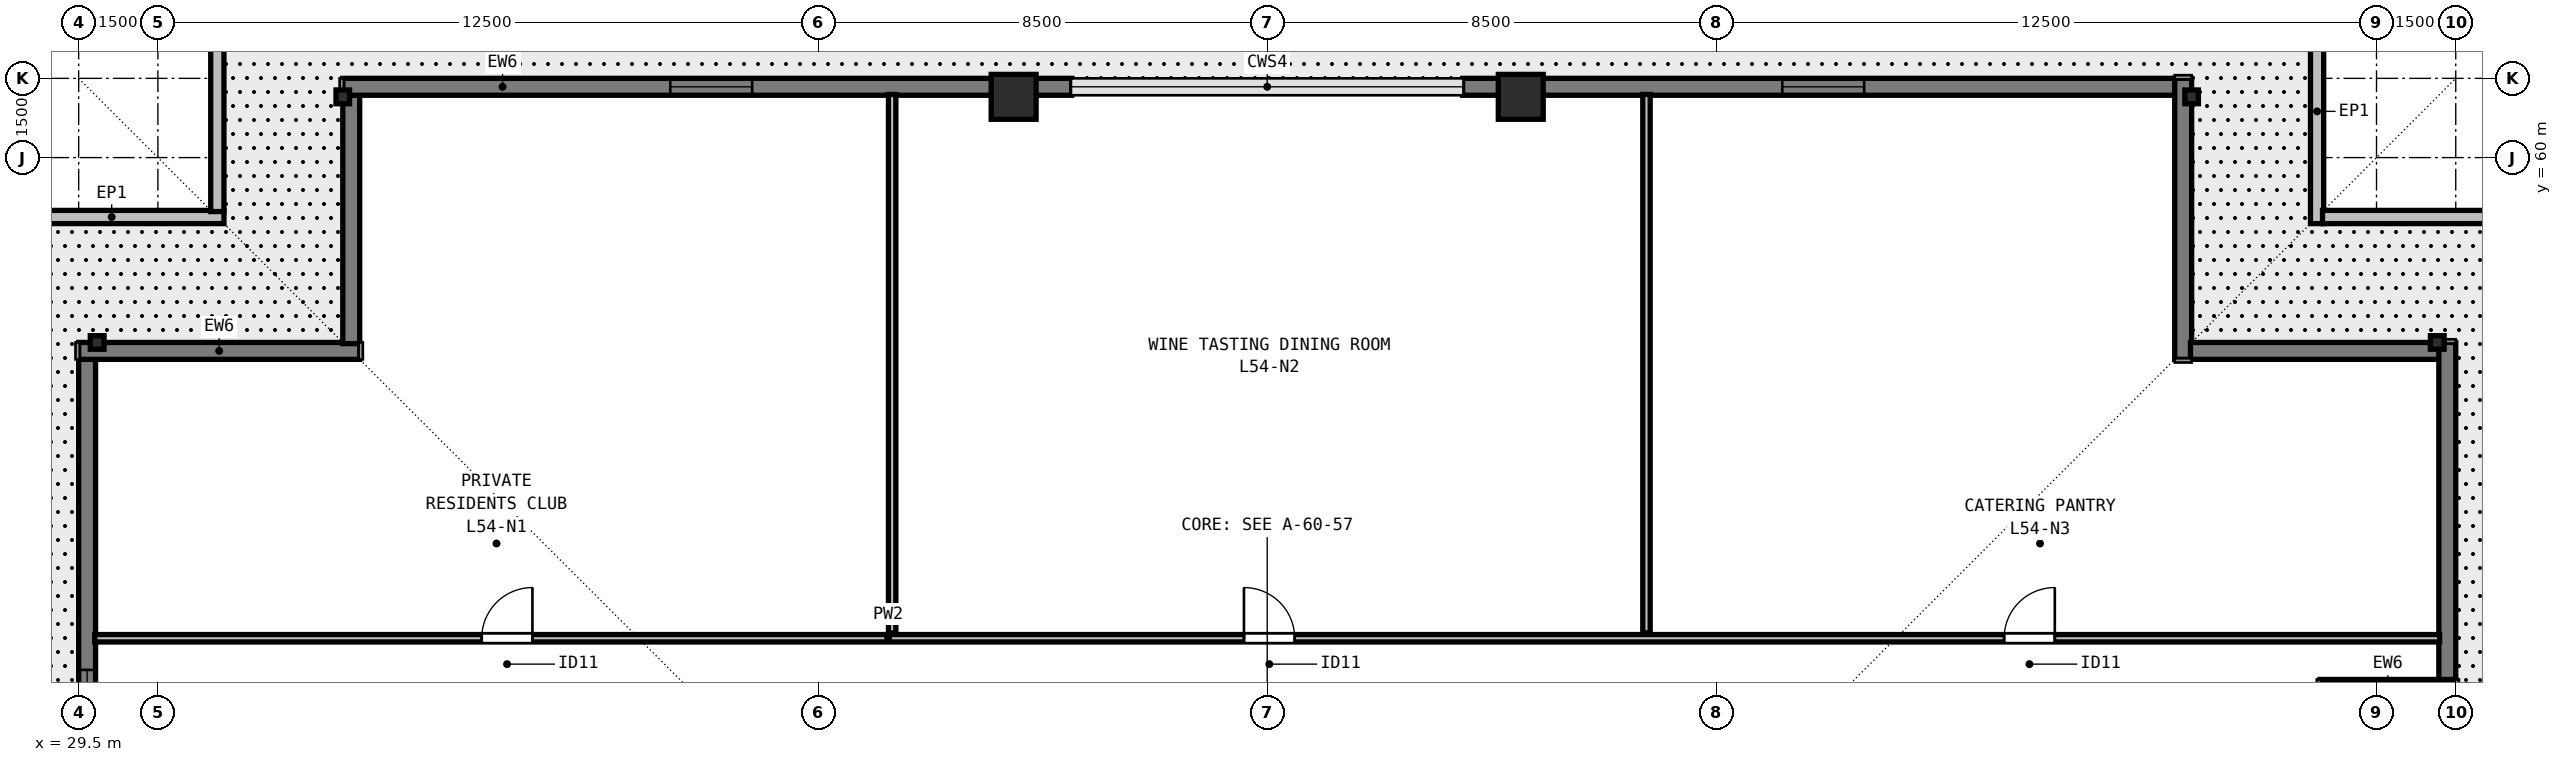
"""IFC4 building model, lengths in metres.
Left out: names, types, materials, properties, quantities, classifications, styles, units other than length and angle.
Written with IfcOpenShell. Run it as: python <this file> out.ifc"""

import sys

from ifc_helpers import new_model, si_unit, direction, frame, frame_2d, origin, origin_2d, place, context, subcontext, project, spatial, rectangle, i_section, extrude, element, fill, save


model = new_model("IFC4")
c1 = context("Model", 3, precision=1e-05, world=origin(), true_north=direction((0.0, 1.0)))
c2 = subcontext(c1, "Body", "Model", "MODEL_VIEW")
j1 = project(units=[si_unit("LENGTHUNIT", "METRE"), si_unit("PLANEANGLEUNIT", "RADIAN")], contexts=[c1])
p1 = place(None, origin())
s1 = spatial("IfcSite", under=j1, at=p1, CompositionType="ELEMENT")
p2 = place(p1, origin())
s2 = spatial("IfcBuilding", under=s1, at=p2, CompositionType="ELEMENT")
p3 = place(p2, frame((0.0, 0.0, 198.0)))
s3 = spatial("IfcBuildingStorey", under=s2, at=p3, CompositionType="ELEMENT", Elevation=198.0)
for number, where, z_axis, x_axis in (
    (1, (74.15, 56.5, 0.0), (0.0, 0.0, 1.0), (0.0, 1.0, 0.0)),
    (2, (69.5, 61.15, 0.0), (0.0, 0.0, 1.0), (1.0, 0.0, 0.0)),
):
    element("IfcColumn", number, at=place(p3, frame(where, z_axis=z_axis, x_axis=x_axis)), inside=s3, PredefinedType="COLUMN", context=c2, shape_type="SweptSolid", body=[
        extrude(i_section(OverallWidth=0.256, OverallDepth=0.26, WebThickness=0.01, FlangeThickness=0.017, FilletRadius=0.013, at=origin_2d()), origin(), (0.0, 0.0, 1.0), 4.5),
    ])
for number, where, z_axis, x_axis in (
    (3, (56.8, 61.15, 0.0), (0.0, 0.0, 1.0), (1.0, 0.0, 0.0)),
    (4, (47.2, 61.15, 0.0), (0.0, 0.0, 1.0), (1.0, 0.0, 0.0)),
):
    element("IfcColumn", number, at=place(p3, frame(where, z_axis=z_axis, x_axis=x_axis)), inside=s3, PredefinedType="COLUMN", context=c2, shape_type="SweptSolid", body=[
        extrude(rectangle(XDim=0.85, YDim=0.85, at=origin_2d()), origin(), (0.0, 0.0, 1.0), 4.5),
    ])
for number, where, z_axis, x_axis in (
    (5, (34.5, 61.15, 0.0), (0.0, 0.0, 1.0), (1.0, 0.0, 0.0)),
    (6, (29.85, 56.5, 0.0), (0.0, 0.0, 1.0), (0.0, 1.0, 0.0)),
):
    element("IfcColumn", number, at=place(p3, frame(where, z_axis=z_axis, x_axis=x_axis)), inside=s3, PredefinedType="COLUMN", context=c2, shape_type="SweptSolid", body=[
        extrude(i_section(OverallWidth=0.256, OverallDepth=0.26, WebThickness=0.01, FlangeThickness=0.017, FilletRadius=0.013, at=origin_2d()), origin(), (0.0, 0.0, 1.0), 4.5),
    ])
p4 = place(p3, frame((28.0, 58.875, 0.0), z_axis=(0.0, 0.0, 1.0), x_axis=(1.0, 0.0, 0.0)))
e7 = element("IfcWall", 7, at=p4, inside=s3, PredefinedType="PARAPET", context=c2, shape_type="SweptSolid", body=[
    extrude(rectangle(XDim=4.25, YDim=0.25, at=frame_2d((2.125, 0.0))), origin(), (0.0, 0.0, 1.0), 1.15),
])
p5 = place(p3, frame((32.125, 58.978, 0.0), z_axis=(0.0, 0.0, 1.0), x_axis=(0.0, 1.0, 0.0)))
e8 = element("IfcWall", 8, at=p5, inside=s3, PredefinedType="PARAPET", context=c2, shape_type="SweptSolid", body=[
    extrude(rectangle(XDim=3.794, YDim=0.25, at=frame_2d((1.897, 0.0))), origin(), (0.0, 0.0, 1.0), 1.15),
])
p6 = place(p3, frame((71.875, 63.0, 0.0), z_axis=(0.0, 0.0, 1.0), x_axis=(0.0, -1.0, 0.0)))
e9 = element("IfcWall", 9, at=p6, inside=s3, PredefinedType="PARAPET", context=c2, shape_type="SweptSolid", body=[
    extrude(rectangle(XDim=4.25, YDim=0.25, at=frame_2d((2.125, 0.0))), origin(), (0.0, 0.0, 1.0), 1.15),
])
p7 = place(p3, frame((71.978, 58.875, 0.0), z_axis=(0.0, 0.0, 1.0), x_axis=(1.0, 0.0, 0.0)))
e10 = element("IfcWall", 10, at=p7, inside=s3, PredefinedType="PARAPET", context=c2, shape_type="SweptSolid", body=[
    extrude(rectangle(XDim=3.794, YDim=0.25, at=frame_2d((1.897, 0.0))), origin(), (0.0, 0.0, 1.0), 1.15),
])
p8 = place(p3, frame((29.66, 42.7, 0.0), z_axis=(0.0, 0.0, 1.0), x_axis=(0.0, 1.0, 0.0)))
e11 = element("IfcWall", 11, at=p8, inside=s3, PredefinedType="SOLIDWALL", context=c2, shape_type="SweptSolid", body=[
    extrude(rectangle(XDim=13.502, YDim=0.32, at=frame_2d((6.751, 0.0))), origin(), (0.0, 0.0, 1.0), 4.29),
])
p9 = place(p8, frame((6.051, 0.0, 0.8)))
e12 = element("IfcOpeningElement", 12, at=p9, cuts=e11, PredefinedType="OPENING", context=c2, shape_type="SweptSolid", body=[
    extrude(rectangle(XDim=1.55, YDim=1.8, at=frame_2d((0.775, 0.9))), frame((0.0, 0.17, 0.0), z_axis=(0.0, -1.0, 0.0), x_axis=(1.0, 0.0, 0.0)), (0.0, 0.0, 1.0), 0.34),
])
p10 = place(p3, frame((29.5, 56.34, 0.0), z_axis=(0.0, 0.0, 1.0), x_axis=(1.0, 0.0, 0.0)))
e13 = element("IfcWall", 13, at=p10, inside=s3, PredefinedType="SOLIDWALL", context=c2, shape_type="SweptSolid", body=[
    extrude(rectangle(XDim=5.32, YDim=0.32, at=frame_2d((2.66, 0.0))), origin(), (0.0, 0.0, 1.0), 4.29),
])
p11 = place(p3, frame((34.66, 56.478, 0.0), z_axis=(0.0, 0.0, 1.0), x_axis=(0.0, 1.0, 0.0)))
e14 = element("IfcWall", 14, at=p11, inside=s3, PredefinedType="SOLIDWALL", context=c2, shape_type="SweptSolid", body=[
    extrude(rectangle(XDim=4.724, YDim=0.32, at=frame_2d((2.362, 0.0))), origin(), (0.0, 0.0, 1.0), 4.29),
])
p12 = place(p3, frame((34.5, 61.34, 0.0), z_axis=(0.0, 0.0, 1.0), x_axis=(1.0, 0.0, 0.0)))
e15 = element("IfcWall", 15, at=p12, inside=s3, PredefinedType="SOLIDWALL", context=c2, shape_type="SweptSolid", body=[
    extrude(rectangle(XDim=13.8, YDim=0.32, at=frame_2d((6.9, 0.0))), origin(), (0.0, 0.0, 1.0), 4.29),
])
p13 = place(p12, frame((6.2, 0.0, 0.8)))
e16 = element("IfcOpeningElement", 16, at=p13, cuts=e15, PredefinedType="OPENING", context=c2, shape_type="SweptSolid", body=[
    extrude(rectangle(XDim=1.55, YDim=1.8, at=frame_2d((0.775, 0.9))), frame((0.0, 0.17, 0.0), z_axis=(0.0, -1.0, 0.0), x_axis=(1.0, 0.0, 0.0)), (0.0, 0.0, 1.0), 0.34),
])
p14 = place(p3, frame((55.7, 61.34, 0.0), z_axis=(0.0, 0.0, 1.0), x_axis=(1.0, 0.0, 0.0)))
e17 = element("IfcWall", 17, at=p14, inside=s3, PredefinedType="SOLIDWALL", context=c2, shape_type="SweptSolid", body=[
    extrude(rectangle(XDim=13.502, YDim=0.32, at=frame_2d((6.751, 0.0))), origin(), (0.0, 0.0, 1.0), 4.29),
])
p15 = place(p14, frame((6.051, 0.0, 0.8)))
e18 = element("IfcOpeningElement", 18, at=p15, cuts=e17, PredefinedType="OPENING", context=c2, shape_type="SweptSolid", body=[
    extrude(rectangle(XDim=1.55, YDim=1.8, at=frame_2d((0.775, 0.9))), frame((0.0, 0.17, 0.0), z_axis=(0.0, -1.0, 0.0), x_axis=(1.0, 0.0, 0.0)), (0.0, 0.0, 1.0), 0.34),
])
p16 = place(p3, frame((69.34, 61.5, 0.0), z_axis=(0.0, 0.0, 1.0), x_axis=(0.0, -1.0, 0.0)))
e19 = element("IfcWall", 19, at=p16, inside=s3, PredefinedType="SOLIDWALL", context=c2, shape_type="SweptSolid", body=[
    extrude(rectangle(XDim=5.32, YDim=0.32, at=frame_2d((2.66, 0.0))), origin(), (0.0, 0.0, 1.0), 4.29),
])
p17 = place(p3, frame((69.478, 56.34, 0.0), z_axis=(0.0, 0.0, 1.0), x_axis=(1.0, 0.0, 0.0)))
e20 = element("IfcWall", 20, at=p17, inside=s3, PredefinedType="SOLIDWALL", context=c2, shape_type="SweptSolid", body=[
    extrude(rectangle(XDim=4.724, YDim=0.32, at=frame_2d((2.362, 0.0))), origin(), (0.0, 0.0, 1.0), 4.29),
])
p18 = place(p3, frame((74.34, 56.5, 0.0), z_axis=(0.0, 0.0, 1.0), x_axis=(0.0, -1.0, 0.0)))
e21 = element("IfcWall", 21, at=p18, inside=s3, PredefinedType="SOLIDWALL", context=c2, shape_type="SweptSolid", body=[
    extrude(rectangle(XDim=6.402, YDim=0.32, at=frame_2d((3.201, 0.0))), origin(), (0.0, 0.0, 1.0), 4.29),
])
p19 = place(p3, frame((74.5, 49.96, 0.0), z_axis=(0.0, 0.0, 1.0), x_axis=(-1.0, 0.0, 0.0)))
e22 = element("IfcWall", 22, at=p19, inside=s3, PredefinedType="SOLIDWALL", context=c2, shape_type="SweptSolid", body=[
    extrude(rectangle(XDim=2.57, YDim=0.32, at=frame_2d((1.285, 0.0))), origin(), (0.0, 0.0, 1.0), 4.29),
])
p20 = place(p3, frame((29.805, 50.9, 0.0), z_axis=(0.0, 0.0, 1.0), x_axis=(1.0, 0.0, 0.0)))
e23 = element("IfcWall", 23, at=p20, inside=s3, PredefinedType="PARTITIONING", context=c2, shape_type="SweptSolid", body=[
    extrude(rectangle(XDim=44.39, YDim=0.14, at=frame_2d((22.195, 0.0))), origin(), (0.0, 0.0, 1.0), 3.958),
])
p21 = place(p20, frame((7.325, 0.0, 0.0)))
e24 = element("IfcOpeningElement", 24, at=p21, cuts=e23, PredefinedType="OPENING", context=c2, shape_type="SweptSolid", body=[
    extrude(rectangle(XDim=0.96, YDim=2.12, at=frame_2d((0.48, 1.06))), frame((0.0, 0.08, 0.0), z_axis=(0.0, -1.0, 0.0), x_axis=(1.0, 0.0, 0.0)), (0.0, 0.0, 1.0), 0.16),
])
p22 = place(p20, frame((21.755, 0.0, 0.0)))
e25 = element("IfcOpeningElement", 25, at=p22, cuts=e23, PredefinedType="OPENING", context=c2, shape_type="SweptSolid", body=[
    extrude(rectangle(XDim=0.96, YDim=2.12, at=frame_2d((0.48, 1.06))), frame((0.0, 0.08, 0.0), z_axis=(0.0, -1.0, 0.0), x_axis=(1.0, 0.0, 0.0)), (0.0, 0.0, 1.0), 0.16),
])
p23 = place(p20, frame((36.145, 0.0, 0.0)))
e26 = element("IfcOpeningElement", 26, at=p23, cuts=e23, PredefinedType="OPENING", context=c2, shape_type="SweptSolid", body=[
    extrude(rectangle(XDim=0.96, YDim=2.12, at=frame_2d((0.48, 1.06))), frame((0.0, 0.08, 0.0), z_axis=(0.0, -1.0, 0.0), x_axis=(1.0, 0.0, 0.0)), (0.0, 0.0, 1.0), 0.16),
])
for number, where, z_axis, x_axis in (
    (27, (44.9, 51.0, 0.0), (0.0, 0.0, 1.0), (0.0, 1.0, 0.0)),
    (28, (59.18, 51.0, 0.0), (0.0, 0.0, 1.0), (0.0, 1.0, 0.0)),
):
    element("IfcWall", number, at=place(p3, frame(where, z_axis=z_axis, x_axis=x_axis)), inside=s3, PredefinedType="PARTITIONING", context=c2, shape_type="SweptSolid", body=[
        extrude(rectangle(XDim=10.195, YDim=0.14, at=frame_2d((5.098, 0.0))), origin(), (0.0, 0.0, 1.0), 4.29),
    ])
p24 = place(p9, origin())
e29 = element("IfcWindow", 29, at=p24, inside=s3, PartitioningType="SINGLE_PANEL", PredefinedType="WINDOW", context=c2, shape_type="SweptSolid", body=[
    extrude(rectangle(XDim=1.55, YDim=1.8, at=frame_2d((0.775, 0.9))), frame((0.0, -0.04, 0.0), z_axis=(0.0, -1.0, 0.0), x_axis=(1.0, 0.0, 0.0)), (0.0, 0.0, 1.0), 0.06),
])
fill(e12, e29)
p25 = place(p13, origin())
e30 = element("IfcWindow", 30, at=p25, inside=s3, PartitioningType="SINGLE_PANEL", PredefinedType="WINDOW", context=c2, shape_type="SweptSolid", body=[
    extrude(rectangle(XDim=1.55, YDim=1.8, at=frame_2d((0.775, 0.9))), frame((0.0, -0.04, 0.0), z_axis=(0.0, -1.0, 0.0), x_axis=(1.0, 0.0, 0.0)), (0.0, 0.0, 1.0), 0.06),
])
fill(e16, e30)
p26 = place(p15, origin())
e31 = element("IfcWindow", 31, at=p26, inside=s3, PartitioningType="SINGLE_PANEL", PredefinedType="WINDOW", context=c2, shape_type="SweptSolid", body=[
    extrude(rectangle(XDim=1.55, YDim=1.8, at=frame_2d((0.775, 0.9))), frame((0.0, -0.04, 0.0), z_axis=(0.0, -1.0, 0.0), x_axis=(1.0, 0.0, 0.0)), (0.0, 0.0, 1.0), 0.06),
])
fill(e18, e31)
p27 = place(p21, origin())
e32 = element("IfcDoor", 32, at=p27, inside=s3, OperationType="SINGLE_SWING_RIGHT", PredefinedType="DOOR", context=c2, shape_type="SweptSolid", body=[
    extrude(rectangle(XDim=0.96, YDim=2.12, at=frame_2d((0.48, 1.06))), frame((0.0, 0.025, 0.0), z_axis=(0.0, -1.0, 0.0), x_axis=(1.0, 0.0, 0.0)), (0.0, 0.0, 1.0), 0.05),
])
fill(e24, e32)
p28 = place(p22, origin())
e33 = element("IfcDoor", 33, at=p28, inside=s3, OperationType="SINGLE_SWING_LEFT", PredefinedType="DOOR", context=c2, shape_type="SweptSolid", body=[
    extrude(rectangle(XDim=0.96, YDim=2.12, at=frame_2d((0.48, 1.06))), frame((0.0, 0.025, 0.0), z_axis=(0.0, -1.0, 0.0), x_axis=(1.0, 0.0, 0.0)), (0.0, 0.0, 1.0), 0.05),
])
fill(e25, e33)
p29 = place(p23, origin())
e34 = element("IfcDoor", 34, at=p29, inside=s3, OperationType="SINGLE_SWING_RIGHT", PredefinedType="DOOR", context=c2, shape_type="SweptSolid", body=[
    extrude(rectangle(XDim=0.96, YDim=2.12, at=frame_2d((0.48, 1.06))), frame((0.0, 0.025, 0.0), z_axis=(0.0, -1.0, 0.0), x_axis=(1.0, 0.0, 0.0)), (0.0, 0.0, 1.0), 0.05),
])
fill(e26, e34)
save(model, sys.argv[1])
